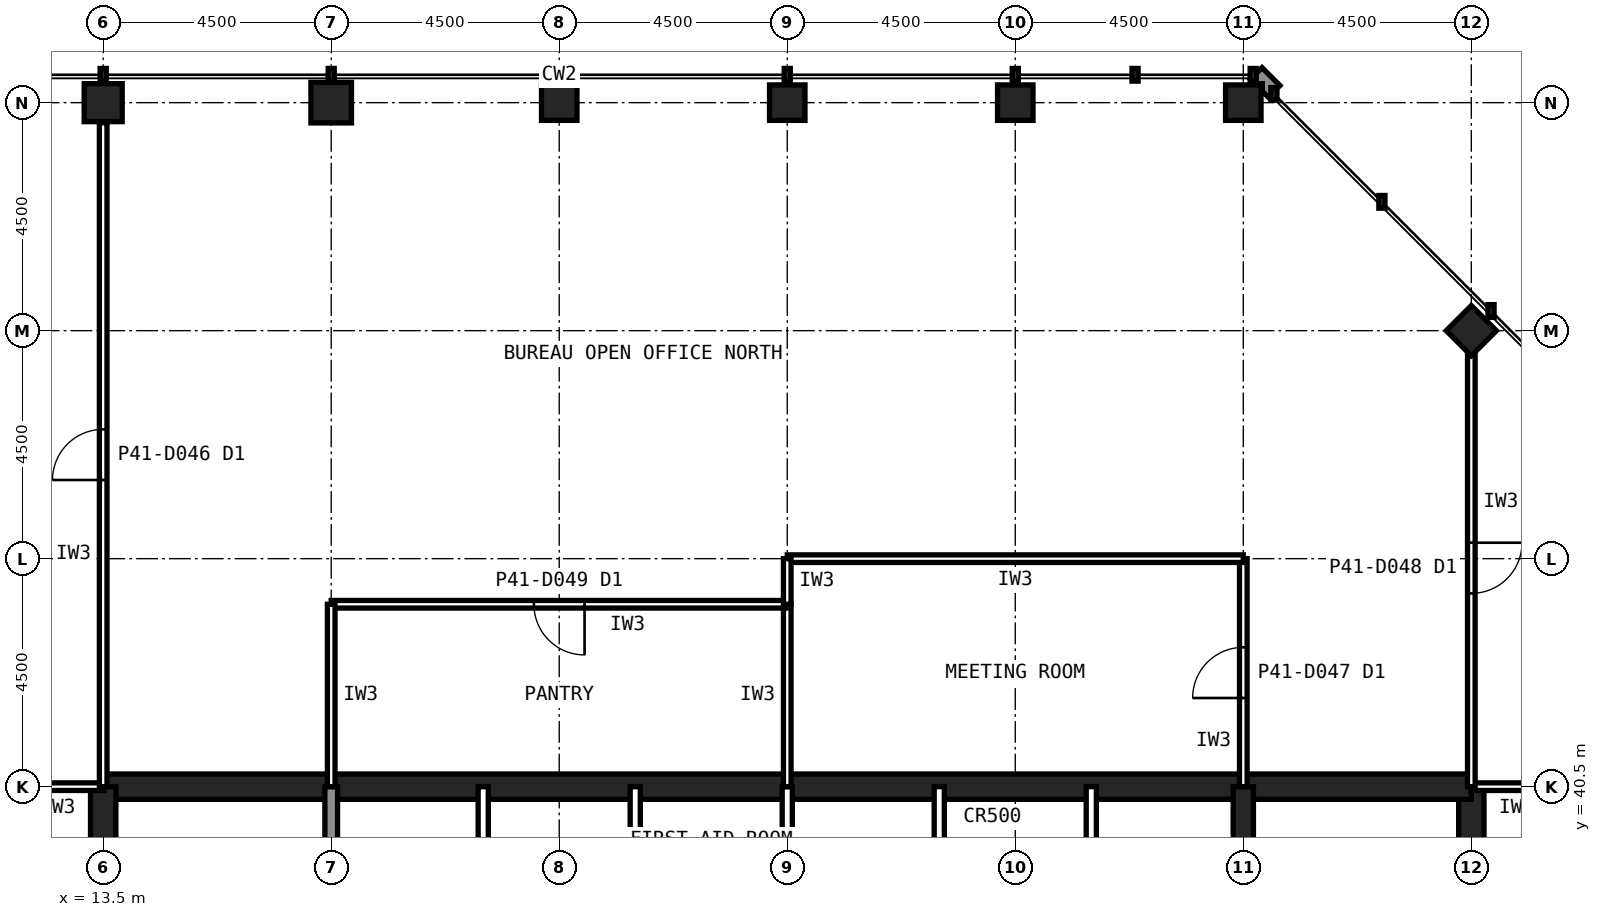
"""IFC4 building model, lengths in metres.
Left out: names, types, materials, properties, quantities, classifications, styles, units other than length and angle.
Written with IfcOpenShell. Run it as: python <this file> out.ifc"""

import sys

from ifc_helpers import new_model, si_unit, direction, frame, frame_2d, origin, origin_2d, place, context, subcontext, project, spatial, rectangle, hollow_rectangle, extrude, element, fill, save


model = new_model("IFC4")
c1 = context("Model", 3, precision=1e-05, world=origin(), true_north=direction((0.0, 1.0)))
c2 = subcontext(c1, "Body", "Model", "MODEL_VIEW")
j1 = project(units=[si_unit("LENGTHUNIT", "METRE"), si_unit("PLANEANGLEUNIT", "RADIAN")], contexts=[c1])
p1 = place(None, origin())
s1 = spatial("IfcSite", under=j1, at=p1, CompositionType="ELEMENT")
p2 = place(p1, origin())
s2 = spatial("IfcBuilding", under=s1, at=p2, CompositionType="ELEMENT")
p3 = place(p2, frame((0.0, 0.0, 175.6)))
s3 = spatial("IfcBuildingStorey", under=s2, at=p3, CompositionType="ELEMENT", Elevation=175.6)
for number, where, z_axis, x_axis in (
    (1, (36.0, 54.0, 0.0), (0.0, 0.0, 1.0), (1.0, 0.0, 0.0)),
    (2, (31.5, 54.0, 0.0), (0.0, 0.0, 1.0), (1.0, 0.0, 0.0)),
    (3, (27.0, 54.0, 0.0), (0.0, 0.0, 1.0), (1.0, 0.0, 0.0)),
    (4, (22.5, 54.0, 0.0), (0.0, 0.0, 1.0), (1.0, 0.0, 0.0)),
):
    element("IfcColumn", number, at=place(p3, frame(where, z_axis=z_axis, x_axis=x_axis)), inside=s3, PredefinedType="COLUMN", context=c2, shape_type="SweptSolid", body=[
        extrude(hollow_rectangle(XDim=0.7, YDim=0.7, WallThickness=0.036, at=origin_2d()), origin(), (0.0, 0.0, 1.0), 4.0),
    ])
p4 = place(p3, frame((18.0, 54.0, 0.0), z_axis=(0.0, 0.0, 1.0), x_axis=(1.0, 0.0, 0.0)))
e5 = element("IfcColumn", 5, at=p4, inside=s3, PredefinedType="COLUMN", context=c2, shape_type="SweptSolid", body=[
    extrude(hollow_rectangle(XDim=0.8, YDim=0.8, WallThickness=0.045, at=origin_2d()), origin(), (0.0, 0.0, 1.0), 4.0),
])
p5 = place(p3, frame((13.5, 54.0, 0.0), z_axis=(0.0, 0.0, 1.0), x_axis=(1.0, 0.0, 0.0)))
e6 = element("IfcColumn", 6, at=p5, inside=s3, PredefinedType="COLUMN", context=c2, shape_type="SweptSolid", body=[
    extrude(hollow_rectangle(XDim=0.75, YDim=0.75, WallThickness=0.04, at=origin_2d()), origin(), (0.0, 0.0, 1.0), 4.0),
])
p6 = place(p3, frame((40.5, 49.5, 0.0), z_axis=(0.0, 0.0, 1.0), x_axis=(0.707106781187, 0.707106781187, 0.0)))
e7 = element("IfcColumn", 7, at=p6, inside=s3, PredefinedType="COLUMN", context=c2, shape_type="SweptSolid", body=[
    extrude(hollow_rectangle(XDim=0.7, YDim=0.7, WallThickness=0.036, at=origin_2d()), origin(), (0.0, 0.0, 1.0), 4.0),
])
p7 = place(p3, frame((40.5, 13.5, 0.0), z_axis=(0.0, 0.0, 1.0), x_axis=(0.0, 1.0, 0.0)))
e8 = element("IfcWall", 8, at=p7, inside=s3, PredefinedType="SHEAR", context=c2, shape_type="SweptSolid", body=[
    extrude(rectangle(XDim=27.0, YDim=0.5, at=frame_2d((13.5, 0.0))), origin(), (0.0, 0.0, 1.0), 4.0),
])
p8 = place(p7, frame((5.85, 0.0, 0.0)))
e9 = element("IfcOpeningElement", 9, at=p8, cuts=e8, PredefinedType="OPENING", context=c2, shape_type="SweptSolid", body=[
    extrude(rectangle(XDim=1.8, YDim=2.1, at=frame_2d((0.9, 1.05))), frame((0.0, 0.26, 0.0), z_axis=(0.0, -1.0, 0.0), x_axis=(1.0, 0.0, 0.0)), (0.0, 0.0, 1.0), 0.52),
])
p9 = place(p7, frame((19.65, 0.0, 0.0)))
e10 = element("IfcOpeningElement", 10, at=p9, cuts=e8, PredefinedType="OPENING", context=c2, shape_type="SweptSolid", body=[
    extrude(rectangle(XDim=1.2, YDim=2.1, at=frame_2d((0.6, 1.05))), frame((0.0, 0.26, 0.0), z_axis=(0.0, -1.0, 0.0), x_axis=(1.0, 0.0, 0.0)), (0.0, 0.0, 1.0), 0.52),
])
p10 = place(p3, frame((40.5, 40.5, 0.0), z_axis=(0.0, 0.0, 1.0), x_axis=(-1.0, 0.0, 0.0)))
e11 = element("IfcWall", 11, at=p10, inside=s3, PredefinedType="SHEAR", context=c2, shape_type="SweptSolid", body=[
    extrude(rectangle(XDim=27.0, YDim=0.5, at=frame_2d((13.5, 0.0))), origin(), (0.0, 0.0, 1.0), 4.0),
])
p11 = place(p3, frame((13.5, 40.5, 0.0), z_axis=(0.0, 0.0, 1.0), x_axis=(0.0, -1.0, 0.0)))
e12 = element("IfcWall", 12, at=p11, inside=s3, PredefinedType="SHEAR", context=c2, shape_type="SweptSolid", body=[
    extrude(rectangle(XDim=27.0, YDim=0.5, at=frame_2d((13.5, 0.0))), origin(), (0.0, 0.0, 1.0), 4.0),
])
p12 = place(p11, frame((19.65, 0.0, 0.0)))
e13 = element("IfcOpeningElement", 13, at=p12, cuts=e12, PredefinedType="OPENING", context=c2, shape_type="SweptSolid", body=[
    extrude(rectangle(XDim=1.2, YDim=2.1, at=frame_2d((0.6, 1.05))), frame((0.0, 0.26, 0.0), z_axis=(0.0, -1.0, 0.0), x_axis=(1.0, 0.0, 0.0)), (0.0, 0.0, 1.0), 0.52),
])
p13 = place(p11, frame((5.85, 0.0, 0.0)))
e14 = element("IfcOpeningElement", 14, at=p13, cuts=e12, PredefinedType="OPENING", context=c2, shape_type="SweptSolid", body=[
    extrude(rectangle(XDim=1.8, YDim=2.1, at=frame_2d((0.9, 1.05))), frame((0.0, 0.26, 0.0), z_axis=(0.0, -1.0, 0.0), x_axis=(1.0, 0.0, 0.0)), (0.0, 0.0, 1.0), 0.52),
])
p14 = place(p3, frame((18.0, 36.0, 0.0), z_axis=(0.0, 0.0, 1.0), x_axis=(0.0, 1.0, 0.0)))
e15 = element("IfcWall", 15, at=p14, inside=s3, PredefinedType="SOLIDWALL", context=c2, shape_type="SweptSolid", body=[
    extrude(rectangle(XDim=4.5, YDim=0.25, at=frame_2d((2.25, 0.0))), origin(), (0.0, 0.0, 1.0), 3.84),
])
p15 = place(p3, frame((36.0, 22.5, 0.0), z_axis=(0.0, 0.0, 1.0), x_axis=(0.0, 1.0, 0.0)))
e16 = element("IfcWall", 16, at=p15, inside=s3, PredefinedType="SHEAR", context=c2, shape_type="SweptSolid", body=[
    extrude(rectangle(XDim=18.0, YDim=0.4, at=frame_2d((9.0, 0.0))), origin(), (0.0, 0.0, 1.0), 4.0),
])
for number, where, z_axis, x_axis in (
    (17, (21.0, 36.0, 0.0), (0.0, 0.0, 1.0), (0.0, 1.0, 0.0)),
    (18, (24.0, 36.0, 0.0), (0.0, 0.0, 1.0), (0.0, 1.0, 0.0)),
    (19, (27.0, 36.0, 0.0), (0.0, 0.0, 1.0), (0.0, 1.0, 0.0)),
    (20, (30.0, 36.0, 0.0), (0.0, 0.0, 1.0), (0.0, 1.0, 0.0)),
    (21, (33.0, 36.0, 0.0), (0.0, 0.0, 1.0), (0.0, 1.0, 0.0)),
):
    element("IfcWall", number, at=place(p3, frame(where, z_axis=z_axis, x_axis=x_axis)), inside=s3, PredefinedType="PARTITIONING", context=c2, shape_type="SweptSolid", body=[
        extrude(rectangle(XDim=4.5, YDim=0.2, at=frame_2d((2.25, 0.0))), origin(), (0.0, 0.0, 1.0), 3.84),
    ])
for number, where, z_axis, x_axis in (
    (22, (13.51, 40.5, 0.0), (0.0, 0.0, 1.0), (-1.0, 0.0, 0.0)),
    (23, (42.3, 40.5, 0.0), (0.0, 0.0, 1.0), (-1.0, 0.0, 0.0)),
):
    element("IfcWall", number, at=place(p3, frame(where, z_axis=z_axis, x_axis=x_axis)), inside=s3, PredefinedType="PARTITIONING", context=c2, shape_type="SweptSolid", body=[
        extrude(rectangle(XDim=1.81, YDim=0.15, at=frame_2d((0.905, 0.0))), origin(), (0.0, 0.0, 1.0), 2.989),
    ])
p16 = place(p3, frame((27.0, 40.5, 0.0), z_axis=(0.0, 0.0, 1.0), x_axis=(0.0, 1.0, 0.0)))
e24 = element("IfcWall", 24, at=p16, inside=s3, PredefinedType="PARTITIONING", context=c2, shape_type="SweptSolid", body=[
    extrude(rectangle(XDim=3.6, YDim=0.15, at=frame_2d((1.8, 0.0))), origin(), (0.0, 0.0, 1.0), 2.989),
])
p17 = place(p3, frame((27.0, 44.1, 0.0), z_axis=(0.0, 0.0, 1.0), x_axis=(-1.0, 0.0, 0.0)))
e25 = element("IfcWall", 25, at=p17, inside=s3, PredefinedType="PARTITIONING", context=c2, shape_type="SweptSolid", body=[
    extrude(rectangle(XDim=9.0, YDim=0.15, at=frame_2d((4.5, 0.0))), origin(), (0.0, 0.0, 1.0), 3.84),
])
p18 = place(p17, frame((4.0, 0.0, 0.0)))
e26 = element("IfcOpeningElement", 26, at=p18, cuts=e25, PredefinedType="OPENING", context=c2, shape_type="SweptSolid", body=[
    extrude(rectangle(XDim=1.0, YDim=2.1, at=frame_2d((0.5, 1.05))), frame((0.0, 0.085, 0.0), z_axis=(0.0, -1.0, 0.0), x_axis=(1.0, 0.0, 0.0)), (0.0, 0.0, 1.0), 0.17),
])
p19 = place(p3, frame((18.0, 44.1, 0.0), z_axis=(0.0, 0.0, 1.0), x_axis=(0.0, -1.0, 0.0)))
e27 = element("IfcWall", 27, at=p19, inside=s3, PredefinedType="PARTITIONING", context=c2, shape_type="SweptSolid", body=[
    extrude(rectangle(XDim=3.6, YDim=0.15, at=frame_2d((1.8, 0.0))), origin(), (0.0, 0.0, 1.0), 2.989),
])
p20 = place(p3, frame((36.0, 40.5, 0.0), z_axis=(0.0, 0.0, 1.0), x_axis=(0.0, 1.0, 0.0)))
e28 = element("IfcWall", 28, at=p20, inside=s3, PredefinedType="PARTITIONING", context=c2, shape_type="SweptSolid", body=[
    extrude(rectangle(XDim=4.5, YDim=0.15, at=frame_2d((2.25, 0.0))), origin(), (0.0, 0.0, 1.0), 2.989),
])
p21 = place(p20, frame((1.75, 0.0, 0.0)))
e29 = element("IfcOpeningElement", 29, at=p21, cuts=e28, PredefinedType="OPENING", context=c2, shape_type="SweptSolid", body=[
    extrude(rectangle(XDim=1.0, YDim=2.1, at=frame_2d((0.5, 1.05))), frame((0.0, 0.085, 0.0), z_axis=(0.0, -1.0, 0.0), x_axis=(1.0, 0.0, 0.0)), (0.0, 0.0, 1.0), 0.17),
])
p22 = place(p3, frame((36.0, 45.0, 0.0), z_axis=(0.0, 0.0, 1.0), x_axis=(-1.0, 0.0, 0.0)))
e30 = element("IfcWall", 30, at=p22, inside=s3, PredefinedType="PARTITIONING", context=c2, shape_type="SweptSolid", body=[
    extrude(rectangle(XDim=9.0, YDim=0.15, at=frame_2d((4.5, 0.0))), origin(), (0.0, 0.0, 1.0), 3.84),
])
p23 = place(p3, frame((27.0, 45.0, 0.0), z_axis=(0.0, 0.0, 1.0), x_axis=(0.0, -1.0, 0.0)))
e31 = element("IfcWall", 31, at=p23, inside=s3, PredefinedType="PARTITIONING", context=c2, shape_type="SweptSolid", body=[
    extrude(rectangle(XDim=0.9, YDim=0.15, at=frame_2d((0.45, 0.0))), origin(), (0.0, 0.0, 1.0), 2.989),
])
p24 = place(p3, frame((13.5, 40.5, 0.0), z_axis=(0.0, 0.0, 1.0), x_axis=(0.0, 1.0, 0.0)))
e32 = element("IfcWall", 32, at=p24, inside=s3, PredefinedType="PARTITIONING", context=c2, shape_type="SweptSolid", body=[
    extrude(rectangle(XDim=13.105, YDim=0.15, at=frame_2d((6.552, 0.0))), origin(), (0.0, 0.0, 1.0), 2.989),
])
p25 = place(p24, frame((6.052, 0.0, 0.0)))
e33 = element("IfcOpeningElement", 33, at=p25, cuts=e32, PredefinedType="OPENING", context=c2, shape_type="SweptSolid", body=[
    extrude(rectangle(XDim=1.0, YDim=2.1, at=frame_2d((0.5, 1.05))), frame((0.0, 0.085, 0.0), z_axis=(0.0, -1.0, 0.0), x_axis=(1.0, 0.0, 0.0)), (0.0, 0.0, 1.0), 0.17),
])
p26 = place(p3, frame((40.5, 49.13, 0.0), z_axis=(0.0, 0.0, 1.0), x_axis=(0.0, -1.0, 0.0)))
e34 = element("IfcWall", 34, at=p26, inside=s3, PredefinedType="PARTITIONING", context=c2, shape_type="SweptSolid", body=[
    extrude(rectangle(XDim=8.63, YDim=0.15, at=frame_2d((4.315, 0.0))), origin(), (0.0, 0.0, 1.0), 2.989),
])
p27 = place(p26, frame((3.815, 0.0, 0.0)))
e35 = element("IfcOpeningElement", 35, at=p27, cuts=e34, PredefinedType="OPENING", context=c2, shape_type="SweptSolid", body=[
    extrude(rectangle(XDim=1.0, YDim=2.1, at=frame_2d((0.5, 1.05))), frame((0.0, 0.085, 0.0), z_axis=(0.0, -1.0, 0.0), x_axis=(1.0, 0.0, 0.0)), (0.0, 0.0, 1.0), 0.17),
])
p28 = place(p18, origin())
e36 = element("IfcDoor", 36, at=p28, inside=s3, OperationType="SINGLE_SWING_LEFT", PredefinedType="DOOR", context=c2, shape_type="SweptSolid", body=[
    extrude(rectangle(XDim=1.0, YDim=2.1, at=frame_2d((0.5, 1.05))), frame((0.0, 0.025, 0.0), z_axis=(0.0, -1.0, 0.0), x_axis=(1.0, 0.0, 0.0)), (0.0, 0.0, 1.0), 0.05),
])
fill(e26, e36)
p29 = place(p21, origin())
e37 = element("IfcDoor", 37, at=p29, inside=s3, OperationType="SINGLE_SWING_LEFT", PredefinedType="DOOR", context=c2, shape_type="SweptSolid", body=[
    extrude(rectangle(XDim=1.0, YDim=2.1, at=frame_2d((0.5, 1.05))), frame((0.0, 0.025, 0.0), z_axis=(0.0, -1.0, 0.0), x_axis=(1.0, 0.0, 0.0)), (0.0, 0.0, 1.0), 0.05),
])
fill(e29, e37)
p30 = place(p25, origin())
e38 = element("IfcDoor", 38, at=p30, inside=s3, OperationType="SINGLE_SWING_LEFT", PredefinedType="DOOR", context=c2, shape_type="SweptSolid", body=[
    extrude(rectangle(XDim=1.0, YDim=2.1, at=frame_2d((0.5, 1.05))), frame((0.0, 0.025, 0.0), z_axis=(0.0, -1.0, 0.0), x_axis=(1.0, 0.0, 0.0)), (0.0, 0.0, 1.0), 0.05),
])
fill(e33, e38)
p31 = place(p27, origin())
e39 = element("IfcDoor", 39, at=p31, inside=s3, OperationType="SINGLE_SWING_LEFT", PredefinedType="DOOR", context=c2, shape_type="SweptSolid", body=[
    extrude(rectangle(XDim=1.0, YDim=2.1, at=frame_2d((0.5, 1.05))), frame((0.0, 0.025, 0.0), z_axis=(0.0, -1.0, 0.0), x_axis=(1.0, 0.0, 0.0)), (0.0, 0.0, 1.0), 0.05),
])
fill(e35, e39)
save(model, sys.argv[1])
